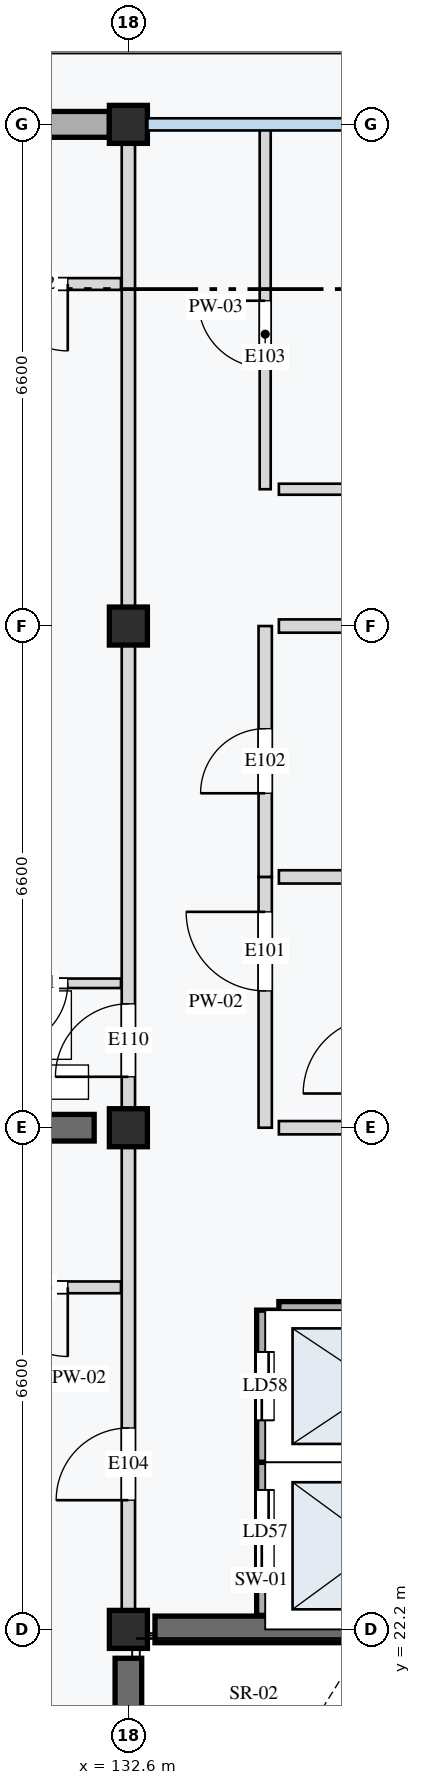
"""IFC4 building model, lengths in metres.
Left out: names, types, materials, properties, quantities, classifications, styles, units other than length and angle.
Written with IfcOpenShell. Run it as: python <this file> out.ifc"""

import sys

from ifc_helpers import new_model, si_unit, direction, frame, frame_2d, origin, origin_2d, place, context, subcontext, project, spatial, rectangle, extrude, element, fill, save


model = new_model("IFC4")
c1 = context("Model", 3, precision=1e-05, world=origin(), true_north=direction((0.0, 1.0)))
c2 = subcontext(c1, "Body", "Model", "MODEL_VIEW")
j1 = project(units=[si_unit("LENGTHUNIT", "METRE"), si_unit("PLANEANGLEUNIT", "RADIAN")], contexts=[c1])
p1 = place(None, origin())
s1 = spatial("IfcSite", under=j1, at=p1, CompositionType="ELEMENT")
p2 = place(p1, origin())
s2 = spatial("IfcBuilding", under=s1, at=p2, CompositionType="ELEMENT")
p3 = place(p2, frame((0.0, 0.0, 4.2)))
s3 = spatial("IfcBuildingStorey", under=s2, at=p3, CompositionType="ELEMENT", Elevation=4.2)
for number, where, z_axis, x_axis in (
    (1, (132.6, 22.2, 0.0), (0.0, 0.0, 1.0), (1.0, 0.0, 0.0)),
    (2, (132.6, 28.8, 0.0), (0.0, 0.0, 1.0), (1.0, 0.0, 0.0)),
    (3, (132.6, 35.4, 0.0), (0.0, 0.0, 1.0), (1.0, 0.0, 0.0)),
    (4, (132.6, 42.0, 0.0), (0.0, 0.0, 1.0), (1.0, 0.0, 0.0)),
):
    element("IfcColumn", number, at=place(p3, frame(where, z_axis=z_axis, x_axis=x_axis)), inside=s3, PredefinedType="COLUMN", context=c2, shape_type="SweptSolid", body=[
        extrude(rectangle(XDim=0.5, YDim=0.5, at=origin_2d()), origin(), (0.0, 0.0, 1.0), 4.2),
    ])
p4 = place(p3, frame((132.6, 15.98, 0.0), z_axis=(0.0, 0.0, 1.0), x_axis=(0.0, 1.0, 0.0)))
e5 = element("IfcWall", 5, at=p4, inside=s3, PredefinedType="SHEAR", context=c2, shape_type="SweptSolid", body=[
    extrude(rectangle(XDim=5.84, YDim=0.35, at=frame_2d((2.92, 0.0))), origin(), (0.0, 0.0, 1.0), 3.96),
])
p5 = place(p3, frame((132.95, 22.2, 0.0), z_axis=(0.0, 0.0, 1.0), x_axis=(1.0, 0.0, 0.0)))
e6 = element("IfcWall", 6, at=p5, inside=s3, PredefinedType="SHEAR", context=c2, shape_type="SweptSolid", body=[
    extrude(rectangle(XDim=2.8, YDim=0.35, at=frame_2d((1.4, 0.0))), origin(), (0.0, 0.0, 1.0), 3.96),
])
p6 = place(p3, frame((126.45, 28.8, 0.0), z_axis=(0.0, 0.0, 1.0), x_axis=(1.0, 0.0, 0.0)))
e7 = element("IfcWall", 7, at=p6, inside=s3, PredefinedType="SHEAR", context=c2, shape_type="SweptSolid", body=[
    extrude(rectangle(XDim=5.7, YDim=0.35, at=frame_2d((2.85, 0.0))), origin(), (0.0, 0.0, 1.0), 3.96),
])
p7 = place(p3, frame((126.25, 42.0, 0.0), z_axis=(0.0, 0.0, 1.0), x_axis=(1.0, 0.0, 0.0)))
e8 = element("IfcWall", 8, at=p7, inside=s3, PredefinedType="STANDARD", context=c2, shape_type="SweptSolid", body=[
    extrude(rectangle(XDim=6.1, YDim=0.34, at=frame_2d((3.05, 0.0))), origin(), (0.0, 0.0, 1.0), 3.65),
])
p8 = place(p3, frame((134.4, 22.385, 0.0), z_axis=(0.0, 0.0, 1.0), x_axis=(0.0, 1.0, 0.0)))
e9 = element("IfcWall", 9, at=p8, inside=s3, PredefinedType="STANDARD", context=c2, shape_type="SweptSolid", body=[
    extrude(rectangle(XDim=2.015, YDim=0.225, at=frame_2d((1.007, 0.0))), origin(), (0.0, 0.0, 1.0), 3.96),
])
p9 = place(p8, frame((0.55, 0.0, 0.0)))
e10 = element("IfcOpeningElement", 10, at=p9, cuts=e9, PredefinedType="OPENING", context=c2, shape_type="SweptSolid", body=[
    extrude(rectangle(XDim=1.1, YDim=2.1, at=frame_2d((0.55, 1.05))), frame((0.0, 0.123, 0.0), z_axis=(0.0, -1.0, 0.0), x_axis=(1.0, 0.0, 0.0)), (0.0, 0.0, 1.0), 0.245),
])
p10 = place(p3, frame((134.4, 24.4, 0.0), z_axis=(0.0, 0.0, 1.0), x_axis=(0.0, 1.0, 0.0)))
e11 = element("IfcWall", 11, at=p10, inside=s3, PredefinedType="STANDARD", context=c2, shape_type="SweptSolid", body=[
    extrude(rectangle(XDim=2.0, YDim=0.225, at=frame_2d((1.0, 0.0))), origin(), (0.0, 0.0, 1.0), 3.96),
])
p11 = place(p10, frame((0.55, 0.0, 0.0)))
e12 = element("IfcOpeningElement", 12, at=p11, cuts=e11, PredefinedType="OPENING", context=c2, shape_type="SweptSolid", body=[
    extrude(rectangle(XDim=0.9, YDim=2.1, at=frame_2d((0.45, 1.05))), frame((0.0, 0.123, 0.0), z_axis=(0.0, -1.0, 0.0), x_axis=(1.0, 0.0, 0.0)), (0.0, 0.0, 1.0), 0.245),
])
for number, where, z_axis, x_axis in (
    (13, (134.58, 24.4, 0.0), (0.0, 0.0, 1.0), (1.0, 0.0, 0.0)),
    (14, (134.58, 26.4, 0.0), (0.0, 0.0, 1.0), (1.0, 0.0, 0.0)),
):
    element("IfcWall", number, at=place(p3, frame(where, z_axis=z_axis, x_axis=x_axis)), inside=s3, PredefinedType="STANDARD", context=c2, shape_type="SweptSolid", body=[
        extrude(rectangle(XDim=2.64, YDim=0.225, at=frame_2d((1.32, 0.0))), origin(), (0.0, 0.0, 1.0), 3.96),
    ])
p12 = place(p3, frame((134.4, 28.8, 0.0), z_axis=(0.0, 0.0, 1.0), x_axis=(0.0, 1.0, 0.0)))
e15 = element("IfcWall", 15, at=p12, inside=s3, PredefinedType="PARTITIONING", context=c2, shape_type="SweptSolid", body=[
    extrude(rectangle(XDim=3.3, YDim=0.175, at=frame_2d((1.65, 0.0))), origin(), (0.0, 0.0, 1.0), 3.96),
])
p13 = place(p12, frame((1.8, 0.0, 0.0)))
e16 = element("IfcOpeningElement", 16, at=p13, cuts=e15, PredefinedType="OPENING", context=c2, shape_type="SweptSolid", body=[
    extrude(rectangle(XDim=1.04, YDim=2.12, at=frame_2d((0.52, 1.06))), frame((0.0, 0.097, 0.0), z_axis=(0.0, -1.0, 0.0), x_axis=(1.0, 0.0, 0.0)), (0.0, 0.0, 1.0), 0.195),
])
p14 = place(p3, frame((134.4, 32.1, 0.0), z_axis=(0.0, 0.0, 1.0), x_axis=(0.0, 1.0, 0.0)))
e17 = element("IfcWall", 17, at=p14, inside=s3, PredefinedType="PARTITIONING", context=c2, shape_type="SweptSolid", body=[
    extrude(rectangle(XDim=3.3, YDim=0.175, at=frame_2d((1.65, 0.0))), origin(), (0.0, 0.0, 1.0), 3.96),
])
p15 = place(p14, frame((1.1, 0.0, 0.0)))
e18 = element("IfcOpeningElement", 18, at=p15, cuts=e17, PredefinedType="OPENING", context=c2, shape_type="SweptSolid", body=[
    extrude(rectangle(XDim=0.85, YDim=2.0, at=frame_2d((0.425, 1.0))), frame((0.0, 0.097, 0.0), z_axis=(0.0, -1.0, 0.0), x_axis=(1.0, 0.0, 0.0)), (0.0, 0.0, 1.0), 0.195),
])
p16 = place(p3, frame((134.58, 28.8, 0.0), z_axis=(0.0, 0.0, 1.0), x_axis=(1.0, 0.0, 0.0)))
e19 = element("IfcWall", 19, at=p16, inside=s3, PredefinedType="PARTITIONING", context=c2, shape_type="SweptSolid", body=[
    extrude(rectangle(XDim=1.14, YDim=0.175, at=frame_2d((0.57, 0.0))), origin(), (0.0, 0.0, 1.0), 3.75),
])
for number, where, z_axis, x_axis in (
    (20, (134.58, 32.1, 0.0), (0.0, 0.0, 1.0), (1.0, 0.0, 0.0)),
    (21, (134.58, 35.4, 0.0), (0.0, 0.0, 1.0), (1.0, 0.0, 0.0)),
):
    element("IfcWall", number, at=place(p3, frame(where, z_axis=z_axis, x_axis=x_axis)), inside=s3, PredefinedType="PARTITIONING", context=c2, shape_type="SweptSolid", body=[
        extrude(rectangle(XDim=1.14, YDim=0.175, at=frame_2d((0.57, 0.0))), origin(), (0.0, 0.0, 1.0), 3.96),
    ])
p17 = place(p3, frame((134.4, 37.2, 0.0), z_axis=(0.0, 0.0, 1.0), x_axis=(0.0, 1.0, 0.0)))
e22 = element("IfcWall", 22, at=p17, inside=s3, PredefinedType="PARTITIONING", context=c2, shape_type="SweptSolid", body=[
    extrude(rectangle(XDim=4.8, YDim=0.145, at=frame_2d((2.4, 0.0))), origin(), (0.0, 0.0, 1.0), 3.96),
])
p18 = place(p17, frame((1.6, 0.0, 0.0)))
e23 = element("IfcOpeningElement", 23, at=p18, cuts=e22, PredefinedType="OPENING", context=c2, shape_type="SweptSolid", body=[
    extrude(rectangle(XDim=0.88, YDim=2.1, at=frame_2d((0.44, 1.05))), frame((0.0, 0.083, 0.0), z_axis=(0.0, -1.0, 0.0), x_axis=(1.0, 0.0, 0.0)), (0.0, 0.0, 1.0), 0.165),
])
p19 = place(p3, frame((134.58, 37.2, 0.0), z_axis=(0.0, 0.0, 1.0), x_axis=(1.0, 0.0, 0.0)))
e24 = element("IfcWall", 24, at=p19, inside=s3, PredefinedType="PARTITIONING", context=c2, shape_type="SweptSolid", body=[
    extrude(rectangle(XDim=2.64, YDim=0.145, at=frame_2d((1.32, 0.0))), origin(), (0.0, 0.0, 1.0), 3.96),
])
p20 = place(p3, frame((132.6, 22.2, 0.0), z_axis=(0.0, 0.0, 1.0), x_axis=(0.0, 1.0, 0.0)))
e25 = element("IfcWall", 25, at=p20, inside=s3, PredefinedType="PARTITIONING", context=c2, shape_type="SweptSolid", body=[
    extrude(rectangle(XDim=6.6, YDim=0.175, at=frame_2d((3.3, 0.0))), origin(), (0.0, 0.0, 1.0), 3.7),
])
p21 = place(p20, frame((1.7, 0.0, 0.0)))
e26 = element("IfcOpeningElement", 26, at=p21, cuts=e25, PredefinedType="OPENING", context=c2, shape_type="SweptSolid", body=[
    extrude(rectangle(XDim=0.95, YDim=2.16, at=frame_2d((0.475, 1.08))), frame((0.0, 0.097, 0.0), z_axis=(0.0, -1.0, 0.0), x_axis=(1.0, 0.0, 0.0)), (0.0, 0.0, 1.0), 0.195),
])
p22 = place(p3, frame((132.502, 26.7, 0.0), z_axis=(0.0, 0.0, 1.0), x_axis=(-1.0, 0.0, 0.0)))
e27 = element("IfcWall", 27, at=p22, inside=s3, PredefinedType="PARTITIONING", context=c2, shape_type="SweptSolid", body=[
    extrude(rectangle(XDim=2.302, YDim=0.155, at=frame_2d((1.151, 0.0))), origin(), (0.0, 0.0, 1.0), 3.96),
])
p23 = place(p22, frame((0.7, 0.0, 0.0)))
e28 = element("IfcOpeningElement", 28, at=p23, cuts=e27, PredefinedType="OPENING", context=c2, shape_type="SweptSolid", body=[
    extrude(rectangle(XDim=0.91, YDim=2.14, at=frame_2d((0.455, 1.07))), frame((0.0, 0.087, 0.0), z_axis=(0.0, -1.0, 0.0), x_axis=(1.0, 0.0, 0.0)), (0.0, 0.0, 1.0), 0.175),
])
p24 = place(p3, frame((132.6, 28.8, 0.0), z_axis=(0.0, 0.0, 1.0), x_axis=(0.0, 1.0, 0.0)))
e29 = element("IfcWall", 29, at=p24, inside=s3, PredefinedType="PARTITIONING", context=c2, shape_type="SweptSolid", body=[
    extrude(rectangle(XDim=13.2, YDim=0.175, at=frame_2d((6.6, 0.0))), origin(), (0.0, 0.0, 1.0), 3.7),
])
p25 = place(p24, frame((0.67, 0.0, 0.0)))
e30 = element("IfcOpeningElement", 30, at=p25, cuts=e29, PredefinedType="OPENING", context=c2, shape_type="SweptSolid", body=[
    extrude(rectangle(XDim=0.96, YDim=2.18, at=frame_2d((0.48, 1.09))), frame((0.0, 0.097, 0.0), z_axis=(0.0, -1.0, 0.0), x_axis=(1.0, 0.0, 0.0)), (0.0, 0.0, 1.0), 0.195),
])
p26 = place(p3, frame((132.502, 30.7, 0.0), z_axis=(0.0, 0.0, 1.0), x_axis=(-1.0, 0.0, 0.0)))
e31 = element("IfcWall", 31, at=p26, inside=s3, PredefinedType="PARTITIONING", context=c2, shape_type="SweptSolid", body=[
    extrude(rectangle(XDim=2.302, YDim=0.125, at=frame_2d((1.151, 0.0))), origin(), (0.0, 0.0, 1.0), 3.96),
])
p27 = place(p26, frame((0.7, 0.0, 0.0)))
e32 = element("IfcOpeningElement", 32, at=p27, cuts=e31, PredefinedType="OPENING", context=c2, shape_type="SweptSolid", body=[
    extrude(rectangle(XDim=0.85, YDim=2.04, at=frame_2d((0.425, 1.02))), frame((0.0, 0.073, 0.0), z_axis=(0.0, -1.0, 0.0), x_axis=(1.0, 0.0, 0.0)), (0.0, 0.0, 1.0), 0.145),
])
p28 = place(p3, frame((132.502, 39.9, 0.0), z_axis=(0.0, 0.0, 1.0), x_axis=(-1.0, 0.0, 0.0)))
e33 = element("IfcWall", 33, at=p28, inside=s3, PredefinedType="PARTITIONING", context=c2, shape_type="SweptSolid", body=[
    extrude(rectangle(XDim=2.302, YDim=0.155, at=frame_2d((1.151, 0.0))), origin(), (0.0, 0.0, 1.0), 3.96),
])
p29 = place(p28, frame((0.7, 0.0, 0.0)))
e34 = element("IfcOpeningElement", 34, at=p29, cuts=e33, PredefinedType="OPENING", context=c2, shape_type="SweptSolid", body=[
    extrude(rectangle(XDim=0.88, YDim=2.1, at=frame_2d((0.44, 1.05))), frame((0.0, 0.087, 0.0), z_axis=(0.0, -1.0, 0.0), x_axis=(1.0, 0.0, 0.0)), (0.0, 0.0, 1.0), 0.175),
])
p30 = place(p9, origin())
e35 = element("IfcDoor", 35, at=p30, inside=s3, OperationType="DOUBLE_DOOR_SLIDING", PredefinedType="DOOR", context=c2, shape_type="SweptSolid", body=[
    extrude(rectangle(XDim=1.1, YDim=2.1, at=frame_2d((0.55, 1.05))), frame((0.0, 0.025, 0.0), z_axis=(0.0, -1.0, 0.0), x_axis=(1.0, 0.0, 0.0)), (0.0, 0.0, 1.0), 0.05),
])
fill(e10, e35)
p31 = place(p11, origin())
e36 = element("IfcDoor", 36, at=p31, inside=s3, OperationType="DOUBLE_DOOR_SLIDING", PredefinedType="DOOR", context=c2, shape_type="SweptSolid", body=[
    extrude(rectangle(XDim=0.9, YDim=2.1, at=frame_2d((0.45, 1.05))), frame((0.0, 0.025, 0.0), z_axis=(0.0, -1.0, 0.0), x_axis=(1.0, 0.0, 0.0)), (0.0, 0.0, 1.0), 0.05),
])
fill(e12, e36)
p32 = place(p13, origin())
e37 = element("IfcDoor", 37, at=p32, inside=s3, OperationType="SINGLE_SWING_RIGHT", PredefinedType="DOOR", context=c2, shape_type="SweptSolid", body=[
    extrude(rectangle(XDim=1.04, YDim=2.12, at=frame_2d((0.52, 1.06))), frame((0.0, 0.025, 0.0), z_axis=(0.0, -1.0, 0.0), x_axis=(1.0, 0.0, 0.0)), (0.0, 0.0, 1.0), 0.05),
])
fill(e16, e37)
p33 = place(p15, origin())
e38 = element("IfcDoor", 38, at=p33, inside=s3, OperationType="SINGLE_SWING_LEFT", PredefinedType="DOOR", context=c2, shape_type="SweptSolid", body=[
    extrude(rectangle(XDim=0.85, YDim=2.0, at=frame_2d((0.425, 1.0))), frame((0.0, 0.025, 0.0), z_axis=(0.0, -1.0, 0.0), x_axis=(1.0, 0.0, 0.0)), (0.0, 0.0, 1.0), 0.05),
])
fill(e18, e38)
p34 = place(p18, origin())
e39 = element("IfcDoor", 39, at=p34, inside=s3, OperationType="SINGLE_SWING_RIGHT", PredefinedType="DOOR", context=c2, shape_type="SweptSolid", body=[
    extrude(rectangle(XDim=0.88, YDim=2.1, at=frame_2d((0.44, 1.05))), frame((0.0, 0.025, 0.0), z_axis=(0.0, -1.0, 0.0), x_axis=(1.0, 0.0, 0.0)), (0.0, 0.0, 1.0), 0.05),
])
fill(e23, e39)
p35 = place(p21, origin())
e40 = element("IfcDoor", 40, at=p35, inside=s3, OperationType="SINGLE_SWING_LEFT", PredefinedType="DOOR", context=c2, shape_type="SweptSolid", body=[
    extrude(rectangle(XDim=0.95, YDim=2.16, at=frame_2d((0.475, 1.08))), frame((0.0, 0.025, 0.0), z_axis=(0.0, -1.0, 0.0), x_axis=(1.0, 0.0, 0.0)), (0.0, 0.0, 1.0), 0.05),
])
fill(e26, e40)
p36 = place(p23, origin())
e41 = element("IfcDoor", 41, at=p36, inside=s3, OperationType="SINGLE_SWING_LEFT", PredefinedType="DOOR", context=c2, shape_type="SweptSolid", body=[
    extrude(rectangle(XDim=0.91, YDim=2.14, at=frame_2d((0.455, 1.07))), frame((0.0, 0.025, 0.0), z_axis=(0.0, -1.0, 0.0), x_axis=(1.0, 0.0, 0.0)), (0.0, 0.0, 1.0), 0.05),
])
fill(e28, e41)
p37 = place(p25, origin())
e42 = element("IfcDoor", 42, at=p37, inside=s3, OperationType="SINGLE_SWING_LEFT", PredefinedType="DOOR", context=c2, shape_type="SweptSolid", body=[
    extrude(rectangle(XDim=0.96, YDim=2.18, at=frame_2d((0.48, 1.09))), frame((0.0, 0.025, 0.0), z_axis=(0.0, -1.0, 0.0), x_axis=(1.0, 0.0, 0.0)), (0.0, 0.0, 1.0), 0.05),
])
fill(e30, e42)
p38 = place(p27, origin())
e43 = element("IfcDoor", 43, at=p38, inside=s3, OperationType="SINGLE_SWING_RIGHT", PredefinedType="DOOR", context=c2, shape_type="SweptSolid", body=[
    extrude(rectangle(XDim=0.85, YDim=2.04, at=frame_2d((0.425, 1.02))), frame((0.0, 0.025, 0.0), z_axis=(0.0, -1.0, 0.0), x_axis=(1.0, 0.0, 0.0)), (0.0, 0.0, 1.0), 0.05),
])
fill(e32, e43)
p39 = place(p29, origin())
e44 = element("IfcDoor", 44, at=p39, inside=s3, OperationType="SINGLE_SWING_LEFT", PredefinedType="DOOR", context=c2, shape_type="SweptSolid", body=[
    extrude(rectangle(XDim=0.88, YDim=2.1, at=frame_2d((0.44, 1.05))), frame((0.0, 0.025, 0.0), z_axis=(0.0, -1.0, 0.0), x_axis=(1.0, 0.0, 0.0)), (0.0, 0.0, 1.0), 0.05),
])
fill(e34, e44)
save(model, sys.argv[1])
